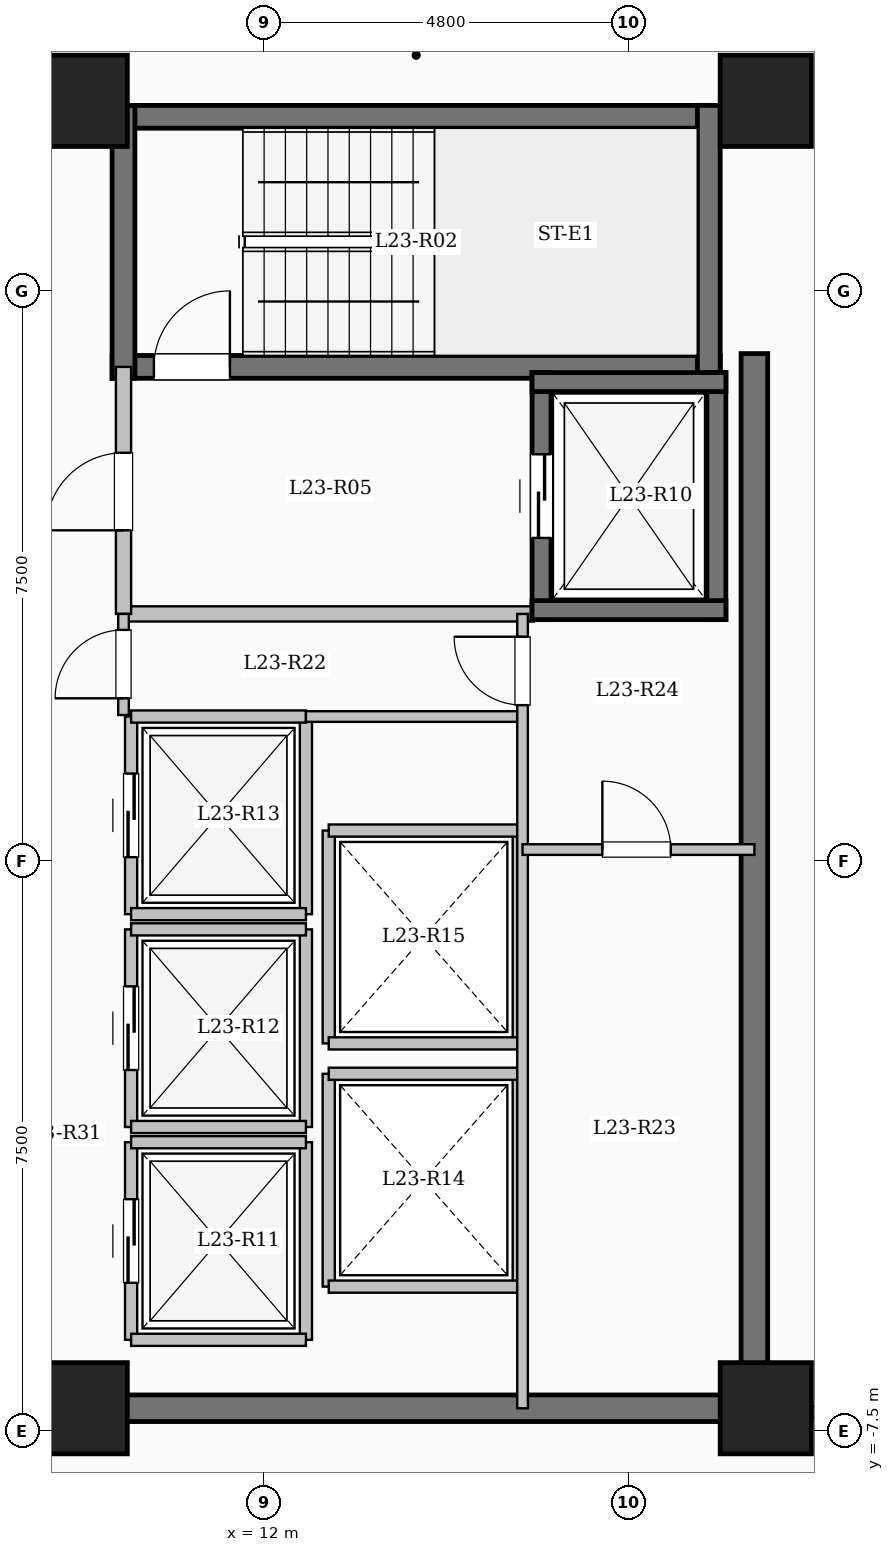
"""IFC4 building model, lengths in metres.
Left out: names, types, materials, properties, quantities, classifications, styles, units other than length and angle.
Written with IfcOpenShell. Run it as: python <this file> out.ifc"""

import sys

from ifc_helpers import new_model, si_unit, direction, frame, frame_2d, origin, origin_2d, place, context, subcontext, project, spatial, rectangle, extrude, element, fill, save


model = new_model("IFC4")
c1 = context("Model", 3, precision=1e-05, world=origin(), true_north=direction((0.0, 1.0)))
c2 = subcontext(c1, "Body", "Model", "MODEL_VIEW")
j1 = project(units=[si_unit("LENGTHUNIT", "METRE"), si_unit("PLANEANGLEUNIT", "RADIAN")], contexts=[c1])
p1 = place(None, origin())
s1 = spatial("IfcSite", under=j1, at=p1, CompositionType="ELEMENT")
p2 = place(p1, origin())
s2 = spatial("IfcBuilding", under=s1, at=p2, CompositionType="ELEMENT")
p3 = place(p2, frame((0.0, 0.0, 88.35)))
s3 = spatial("IfcBuildingStorey", under=s2, at=p3, CompositionType="ELEMENT", Elevation=88.35)
for number, where, z_axis, x_axis in (
    (1, (9.6, -7.2, 0.0), (0.0, 0.0, 1.0), (1.0, 0.0, 0.0)),
    (2, (9.6, 10.0, 0.0), (0.0, 0.0, 1.0), (1.0, 0.0, 0.0)),
    (3, (18.6, -7.2, 0.0), (0.0, 0.0, 1.0), (1.0, 0.0, 0.0)),
    (4, (18.6, 10.0, 0.0), (0.0, 0.0, 1.0), (1.0, 0.0, 0.0)),
):
    element("IfcColumn", number, at=place(p3, frame(where, z_axis=z_axis, x_axis=x_axis)), inside=s3, PredefinedType="COLUMN", context=c2, shape_type="SweptSolid", body=[
        extrude(rectangle(XDim=1.2, YDim=1.2, at=origin_2d()), origin(), (0.0, 0.0, 1.0), 3.35),
    ])
p4 = place(p3, frame((10.0, 9.79, 0.0), z_axis=(0.0, 0.0, 1.0), x_axis=(1.0, 0.0, 0.0)))
e5 = element("IfcWall", 5, at=p4, inside=s3, PredefinedType="SHEAR", context=c2, shape_type="SweptSolid", body=[
    extrude(rectangle(XDim=8.0, YDim=0.3, at=frame_2d((4.0, 0.0))), origin(), (0.0, 0.0, 1.0), 3.35),
])
p5 = place(p3, frame((10.0, 6.5, 0.0), z_axis=(0.0, 0.0, 1.0), x_axis=(1.0, 0.0, 0.0)))
e6 = element("IfcWall", 6, at=p5, inside=s3, PredefinedType="SHEAR", context=c2, shape_type="SweptSolid", body=[
    extrude(rectangle(XDim=8.0, YDim=0.3, at=frame_2d((4.0, 0.0))), origin(), (0.0, 0.0, 1.0), 3.35),
])
p6 = place(p5, frame((0.55, 0.0, 0.0)))
e7 = element("IfcOpeningElement", 7, at=p6, cuts=e6, PredefinedType="OPENING", context=c2, shape_type="SweptSolid", body=[
    extrude(rectangle(XDim=1.0, YDim=2.15, at=frame_2d((0.5, 1.075))), frame((0.0, 0.16, 0.0), z_axis=(0.0, -1.0, 0.0), x_axis=(1.0, 0.0, 0.0)), (0.0, 0.0, 1.0), 0.32),
])
for number, where, z_axis, x_axis in (
    (8, (10.15, 6.35, 0.0), (0.0, 0.0, 1.0), (0.0, 1.0, 0.0)),
    (9, (17.85, 6.35, 0.0), (0.0, 0.0, 1.0), (0.0, 1.0, 0.0)),
):
    element("IfcWall", number, at=place(p3, frame(where, z_axis=z_axis, x_axis=x_axis)), inside=s3, PredefinedType="SHEAR", context=c2, shape_type="SweptSolid", body=[
        extrude(rectangle(XDim=3.59, YDim=0.3, at=frame_2d((1.795, 0.0))), origin(), (0.0, 0.0, 1.0), 3.35),
    ])
p7 = place(p3, frame((10.15, 3.25, 0.0), z_axis=(0.0, 0.0, 1.0), x_axis=(1.0, 0.0, 0.0)))
e10 = element("IfcWall", 10, at=p7, inside=s3, PredefinedType="SOLIDWALL", context=c2, shape_type="SweptSolid", body=[
    extrude(rectangle(XDim=5.4, YDim=0.2, at=frame_2d((2.7, 0.0))), origin(), (0.0, 0.0, 1.0), 3.1),
])
p8 = place(p3, frame((10.15, 3.25, 0.0), z_axis=(0.0, 0.0, 1.0), x_axis=(0.0, 1.0, 0.0)))
e11 = element("IfcWall", 11, at=p8, inside=s3, PredefinedType="SOLIDWALL", context=c2, shape_type="SweptSolid", body=[
    extrude(rectangle(XDim=3.25, YDim=0.2, at=frame_2d((1.625, 0.0))), origin(), (0.0, 0.0, 1.0), 3.1),
])
p9 = place(p8, frame((1.1, 0.0, 0.0)))
e12 = element("IfcOpeningElement", 12, at=p9, cuts=e11, PredefinedType="OPENING", context=c2, shape_type="SweptSolid", body=[
    extrude(rectangle(XDim=1.02, YDim=2.15, at=frame_2d((0.51, 1.075))), frame((0.0, 0.11, 0.0), z_axis=(0.0, -1.0, 0.0), x_axis=(1.0, 0.0, 0.0)), (0.0, 0.0, 1.0), 0.22),
])
p10 = place(p3, frame((15.65, 3.175, 0.0), z_axis=(0.0, 0.0, 1.0), x_axis=(0.0, 1.0, 0.0)))
e13 = element("IfcWall", 13, at=p10, inside=s3, PredefinedType="SHEAR", context=c2, shape_type="SweptSolid", body=[
    extrude(rectangle(XDim=3.25, YDim=0.25, at=frame_2d((1.625, 0.0))), origin(), (0.0, 0.0, 1.0), 3.35),
])
p11 = place(p10, frame((1.075, 0.0, 0.0)))
e14 = element("IfcOpeningElement", 14, at=p11, cuts=e13, PredefinedType="OPENING", context=c2, shape_type="SweptSolid", body=[
    extrude(rectangle(XDim=1.1, YDim=2.15, at=frame_2d((0.55, 1.075))), frame((0.0, 0.135, 0.0), z_axis=(0.0, -1.0, 0.0), x_axis=(1.0, 0.0, 0.0)), (0.0, 0.0, 1.0), 0.27),
])
p12 = place(p3, frame((17.95, 3.175, 0.0), z_axis=(0.0, 0.0, 1.0), x_axis=(0.0, 1.0, 0.0)))
e15 = element("IfcWall", 15, at=p12, inside=s3, PredefinedType="SHEAR", context=c2, shape_type="SweptSolid", body=[
    extrude(rectangle(XDim=3.25, YDim=0.25, at=frame_2d((1.625, 0.0))), origin(), (0.0, 0.0, 1.0), 3.35),
])
for number, where, z_axis, x_axis in (
    (16, (15.525, 3.3, 0.0), (0.0, 0.0, 1.0), (1.0, 0.0, 0.0)),
    (17, (15.525, 6.3, 0.0), (0.0, 0.0, 1.0), (1.0, 0.0, 0.0)),
):
    element("IfcWall", number, at=place(p3, frame(where, z_axis=z_axis, x_axis=x_axis)), inside=s3, PredefinedType="SHEAR", context=c2, shape_type="SweptSolid", body=[
        extrude(rectangle(XDim=2.55, YDim=0.25, at=frame_2d((1.275, 0.0))), origin(), (0.0, 0.0, 1.0), 3.35),
    ])
p13 = place(p3, frame((10.25, -6.3, 0.0), z_axis=(0.0, 0.0, 1.0), x_axis=(0.0, 1.0, 0.0)))
e18 = element("IfcWall", 18, at=p13, inside=s3, PredefinedType="SOLIDWALL", context=c2, shape_type="SweptSolid", body=[
    extrude(rectangle(XDim=2.6, YDim=0.16, at=frame_2d((1.3, 0.0))), origin(), (0.0, 0.0, 1.0), 3.1),
])
p14 = place(p13, frame((0.75, 0.0, 0.0)))
e19 = element("IfcOpeningElement", 19, at=p14, cuts=e18, PredefinedType="OPENING", context=c2, shape_type="SweptSolid", body=[
    extrude(rectangle(XDim=1.1, YDim=2.15, at=frame_2d((0.55, 1.075))), frame((0.0, 0.09, 0.0), z_axis=(0.0, -1.0, 0.0), x_axis=(1.0, 0.0, 0.0)), (0.0, 0.0, 1.0), 0.18),
])
p15 = place(p3, frame((12.55, -6.3, 0.0), z_axis=(0.0, 0.0, 1.0), x_axis=(0.0, 1.0, 0.0)))
e20 = element("IfcWall", 20, at=p15, inside=s3, PredefinedType="SOLIDWALL", context=c2, shape_type="SweptSolid", body=[
    extrude(rectangle(XDim=2.6, YDim=0.16, at=frame_2d((1.3, 0.0))), origin(), (0.0, 0.0, 1.0), 3.1),
])
for number, where, z_axis, x_axis in (
    (21, (10.25, -6.3, 0.0), (0.0, 0.0, 1.0), (1.0, 0.0, 0.0)),
    (22, (10.25, -3.7, 0.0), (0.0, 0.0, 1.0), (1.0, 0.0, 0.0)),
):
    element("IfcWall", number, at=place(p3, frame(where, z_axis=z_axis, x_axis=x_axis)), inside=s3, PredefinedType="SOLIDWALL", context=c2, shape_type="SweptSolid", body=[
        extrude(rectangle(XDim=2.3, YDim=0.16, at=frame_2d((1.15, 0.0))), origin(), (0.0, 0.0, 1.0), 3.1),
    ])
p16 = place(p3, frame((10.25, -3.5, 0.0), z_axis=(0.0, 0.0, 1.0), x_axis=(0.0, 1.0, 0.0)))
e23 = element("IfcWall", 23, at=p16, inside=s3, PredefinedType="SOLIDWALL", context=c2, shape_type="SweptSolid", body=[
    extrude(rectangle(XDim=2.6, YDim=0.16, at=frame_2d((1.3, 0.0))), origin(), (0.0, 0.0, 1.0), 3.1),
])
p17 = place(p16, frame((0.75, 0.0, 0.0)))
e24 = element("IfcOpeningElement", 24, at=p17, cuts=e23, PredefinedType="OPENING", context=c2, shape_type="SweptSolid", body=[
    extrude(rectangle(XDim=1.1, YDim=2.15, at=frame_2d((0.55, 1.075))), frame((0.0, 0.09, 0.0), z_axis=(0.0, -1.0, 0.0), x_axis=(1.0, 0.0, 0.0)), (0.0, 0.0, 1.0), 0.18),
])
p18 = place(p3, frame((12.55, -3.5, 0.0), z_axis=(0.0, 0.0, 1.0), x_axis=(0.0, 1.0, 0.0)))
e25 = element("IfcWall", 25, at=p18, inside=s3, PredefinedType="SOLIDWALL", context=c2, shape_type="SweptSolid", body=[
    extrude(rectangle(XDim=2.6, YDim=0.16, at=frame_2d((1.3, 0.0))), origin(), (0.0, 0.0, 1.0), 3.1),
])
for number, where, z_axis, x_axis in (
    (26, (10.25, -3.5, 0.0), (0.0, 0.0, 1.0), (1.0, 0.0, 0.0)),
    (27, (10.25, -0.9, 0.0), (0.0, 0.0, 1.0), (1.0, 0.0, 0.0)),
):
    element("IfcWall", number, at=place(p3, frame(where, z_axis=z_axis, x_axis=x_axis)), inside=s3, PredefinedType="SOLIDWALL", context=c2, shape_type="SweptSolid", body=[
        extrude(rectangle(XDim=2.3, YDim=0.16, at=frame_2d((1.15, 0.0))), origin(), (0.0, 0.0, 1.0), 3.1),
    ])
p19 = place(p3, frame((10.25, -0.7, 0.0), z_axis=(0.0, 0.0, 1.0), x_axis=(0.0, 1.0, 0.0)))
e28 = element("IfcWall", 28, at=p19, inside=s3, PredefinedType="SOLIDWALL", context=c2, shape_type="SweptSolid", body=[
    extrude(rectangle(XDim=2.6, YDim=0.16, at=frame_2d((1.3, 0.0))), origin(), (0.0, 0.0, 1.0), 3.1),
])
p20 = place(p19, frame((0.75, 0.0, 0.0)))
e29 = element("IfcOpeningElement", 29, at=p20, cuts=e28, PredefinedType="OPENING", context=c2, shape_type="SweptSolid", body=[
    extrude(rectangle(XDim=1.1, YDim=2.15, at=frame_2d((0.55, 1.075))), frame((0.0, 0.09, 0.0), z_axis=(0.0, -1.0, 0.0), x_axis=(1.0, 0.0, 0.0)), (0.0, 0.0, 1.0), 0.18),
])
p21 = place(p3, frame((12.55, -0.7, 0.0), z_axis=(0.0, 0.0, 1.0), x_axis=(0.0, 1.0, 0.0)))
e30 = element("IfcWall", 30, at=p21, inside=s3, PredefinedType="SOLIDWALL", context=c2, shape_type="SweptSolid", body=[
    extrude(rectangle(XDim=2.6, YDim=0.16, at=frame_2d((1.3, 0.0))), origin(), (0.0, 0.0, 1.0), 3.1),
])
for number, where, z_axis, x_axis in (
    (31, (10.25, -0.7, 0.0), (0.0, 0.0, 1.0), (1.0, 0.0, 0.0)),
    (32, (10.25, 1.9, 0.0), (0.0, 0.0, 1.0), (1.0, 0.0, 0.0)),
):
    element("IfcWall", number, at=place(p3, frame(where, z_axis=z_axis, x_axis=x_axis)), inside=s3, PredefinedType="SOLIDWALL", context=c2, shape_type="SweptSolid", body=[
        extrude(rectangle(XDim=2.3, YDim=0.16, at=frame_2d((1.15, 0.0))), origin(), (0.0, 0.0, 1.0), 3.1),
    ])
for number, where, z_axis, x_axis in (
    (33, (12.85, -5.6, 0.0), (0.0, 0.0, 1.0), (0.0, 1.0, 0.0)),
    (34, (15.35, -5.6, 0.0), (0.0, 0.0, 1.0), (0.0, 1.0, 0.0)),
):
    element("IfcWall", number, at=place(p3, frame(where, z_axis=z_axis, x_axis=x_axis)), inside=s3, PredefinedType="SOLIDWALL", context=c2, shape_type="SweptSolid", body=[
        extrude(rectangle(XDim=2.8, YDim=0.16, at=frame_2d((1.4, 0.0))), origin(), (0.0, 0.0, 1.0), 3.1),
    ])
for number, where, z_axis, x_axis in (
    (35, (12.85, -5.6, 0.0), (0.0, 0.0, 1.0), (1.0, 0.0, 0.0)),
    (36, (12.85, -2.8, 0.0), (0.0, 0.0, 1.0), (1.0, 0.0, 0.0)),
):
    element("IfcWall", number, at=place(p3, frame(where, z_axis=z_axis, x_axis=x_axis)), inside=s3, PredefinedType="SOLIDWALL", context=c2, shape_type="SweptSolid", body=[
        extrude(rectangle(XDim=2.5, YDim=0.16, at=frame_2d((1.25, 0.0))), origin(), (0.0, 0.0, 1.0), 3.1),
    ])
for number, where, z_axis, x_axis in (
    (37, (12.85, -2.4, 0.0), (0.0, 0.0, 1.0), (0.0, 1.0, 0.0)),
    (38, (15.35, -2.4, 0.0), (0.0, 0.0, 1.0), (0.0, 1.0, 0.0)),
):
    element("IfcWall", number, at=place(p3, frame(where, z_axis=z_axis, x_axis=x_axis)), inside=s3, PredefinedType="SOLIDWALL", context=c2, shape_type="SweptSolid", body=[
        extrude(rectangle(XDim=2.8, YDim=0.16, at=frame_2d((1.4, 0.0))), origin(), (0.0, 0.0, 1.0), 3.1),
    ])
for number, where, z_axis, x_axis in (
    (39, (12.85, -2.4, 0.0), (0.0, 0.0, 1.0), (1.0, 0.0, 0.0)),
    (40, (12.85, 0.4, 0.0), (0.0, 0.0, 1.0), (1.0, 0.0, 0.0)),
):
    element("IfcWall", number, at=place(p3, frame(where, z_axis=z_axis, x_axis=x_axis)), inside=s3, PredefinedType="SOLIDWALL", context=c2, shape_type="SweptSolid", body=[
        extrude(rectangle(XDim=2.5, YDim=0.16, at=frame_2d((1.25, 0.0))), origin(), (0.0, 0.0, 1.0), 3.1),
    ])
p22 = place(p3, frame((18.45, -7.375, 0.0), z_axis=(0.0, 0.0, 1.0), x_axis=(0.0, 1.0, 0.0)))
e41 = element("IfcWall", 41, at=p22, inside=s3, PredefinedType="SHEAR", context=c2, shape_type="SweptSolid", body=[
    extrude(rectangle(XDim=14.05, YDim=0.35, at=frame_2d((7.025, 0.0))), origin(), (0.0, 0.0, 1.0), 3.35),
])
p23 = place(p3, frame((10.075, -7.2, 0.0), z_axis=(0.0, 0.0, 1.0), x_axis=(1.0, 0.0, 0.0)))
e42 = element("IfcWall", 42, at=p23, inside=s3, PredefinedType="SHEAR", context=c2, shape_type="SweptSolid", body=[
    extrude(rectangle(XDim=8.55, YDim=0.35, at=frame_2d((4.275, 0.0))), origin(), (0.0, 0.0, 1.0), 3.35),
])
p24 = place(p3, frame((12.55, 1.9, 0.0), z_axis=(0.0, 0.0, 1.0), x_axis=(1.0, 0.0, 0.0)))
e43 = element("IfcWall", 43, at=p24, inside=s3, PredefinedType="PARTITIONING", context=c2, shape_type="SweptSolid", body=[
    extrude(rectangle(XDim=2.85, YDim=0.14, at=frame_2d((1.425, 0.0))), origin(), (0.0, 0.0, 1.0), 3.1),
])
p25 = place(p3, frame((10.15, 1.92, 0.0), z_axis=(0.0, 0.0, 1.0), x_axis=(0.0, 1.0, 0.0)))
e44 = element("IfcWall", 44, at=p25, inside=s3, PredefinedType="PARTITIONING", context=c2, shape_type="SweptSolid", body=[
    extrude(rectangle(XDim=1.33, YDim=0.14, at=frame_2d((0.665, 0.0))), origin(), (0.0, 0.0, 1.0), 3.1),
])
p26 = place(p25, frame((0.22, 0.0, 0.0)))
e45 = element("IfcOpeningElement", 45, at=p26, cuts=e44, PredefinedType="OPENING", context=c2, shape_type="SweptSolid", body=[
    extrude(rectangle(XDim=0.9, YDim=2.08, at=frame_2d((0.45, 1.04))), frame((0.0, 0.08, 0.0), z_axis=(0.0, -1.0, 0.0), x_axis=(1.0, 0.0, 0.0)), (0.0, 0.0, 1.0), 0.16),
])
p27 = place(p3, frame((15.4, -7.2, 0.0), z_axis=(0.0, 0.0, 1.0), x_axis=(0.0, 1.0, 0.0)))
e46 = element("IfcWall", 46, at=p27, inside=s3, PredefinedType="PARTITIONING", context=c2, shape_type="SweptSolid", body=[
    extrude(rectangle(XDim=10.45, YDim=0.14, at=frame_2d((5.225, 0.0))), origin(), (0.0, 0.0, 1.0), 3.1),
])
p28 = place(p27, frame((9.25, 0.0, 0.0)))
e47 = element("IfcOpeningElement", 47, at=p28, cuts=e46, PredefinedType="OPENING", context=c2, shape_type="SweptSolid", body=[
    extrude(rectangle(XDim=0.9, YDim=2.08, at=frame_2d((0.45, 1.04))), frame((0.0, 0.08, 0.0), z_axis=(0.0, -1.0, 0.0), x_axis=(1.0, 0.0, 0.0)), (0.0, 0.0, 1.0), 0.16),
])
p29 = place(p3, frame((15.4, 0.15, 0.0), z_axis=(0.0, 0.0, 1.0), x_axis=(1.0, 0.0, 0.0)))
e48 = element("IfcWall", 48, at=p29, inside=s3, PredefinedType="PARTITIONING", context=c2, shape_type="SweptSolid", body=[
    extrude(rectangle(XDim=3.05, YDim=0.14, at=frame_2d((1.525, 0.0))), origin(), (0.0, 0.0, 1.0), 3.1),
])
p30 = place(p29, frame((1.05, 0.0, 0.0)))
e49 = element("IfcOpeningElement", 49, at=p30, cuts=e48, PredefinedType="OPENING", context=c2, shape_type="SweptSolid", body=[
    extrude(rectangle(XDim=0.9, YDim=2.08, at=frame_2d((0.45, 1.04))), frame((0.0, 0.08, 0.0), z_axis=(0.0, -1.0, 0.0), x_axis=(1.0, 0.0, 0.0)), (0.0, 0.0, 1.0), 0.16),
])
p31 = place(p3, frame((18.45, -7.25, 0.0), z_axis=(0.0, 0.0, 1.0), x_axis=(1.0, 0.0, 0.0)))
e50 = element("IfcWall", 50, at=p31, inside=s3, PredefinedType="PARTITIONING", context=c2, shape_type="SweptSolid", body=[
    extrude(rectangle(XDim=8.43, YDim=0.15, at=frame_2d((4.215, 0.0))), origin(), (0.0, 0.0, 1.0), 3.1),
])
p32 = place(p31, frame((1.95, 0.0, 0.0)))
e51 = element("IfcOpeningElement", 51, at=p32, cuts=e50, PredefinedType="OPENING", context=c2, shape_type="SweptSolid", body=[
    extrude(rectangle(XDim=1.08, YDim=2.15, at=frame_2d((0.54, 1.075))), frame((0.0, 0.085, 0.0), z_axis=(0.0, -1.0, 0.0), x_axis=(1.0, 0.0, 0.0)), (0.0, 0.0, 1.0), 0.17),
])
p33 = place(p6, origin())
e52 = element("IfcDoor", 52, at=p33, inside=s3, OperationType="SINGLE_SWING_RIGHT", PredefinedType="DOOR", context=c2, shape_type="SweptSolid", body=[
    extrude(rectangle(XDim=1.0, YDim=2.15, at=frame_2d((0.5, 1.075))), frame((0.0, 0.025, 0.0), z_axis=(0.0, -1.0, 0.0), x_axis=(1.0, 0.0, 0.0)), (0.0, 0.0, 1.0), 0.05),
])
fill(e7, e52)
p34 = place(p9, origin())
e53 = element("IfcDoor", 53, at=p34, inside=s3, OperationType="SINGLE_SWING_LEFT", PredefinedType="DOOR", context=c2, shape_type="SweptSolid", body=[
    extrude(rectangle(XDim=1.02, YDim=2.15, at=frame_2d((0.51, 1.075))), frame((0.0, 0.025, 0.0), z_axis=(0.0, -1.0, 0.0), x_axis=(1.0, 0.0, 0.0)), (0.0, 0.0, 1.0), 0.05),
])
fill(e12, e53)
p35 = place(p11, origin())
e54 = element("IfcDoor", 54, at=p35, inside=s3, OperationType="SLIDING_TO_LEFT", PredefinedType="DOOR", context=c2, shape_type="SweptSolid", body=[
    extrude(rectangle(XDim=1.1, YDim=2.15, at=frame_2d((0.55, 1.075))), frame((0.0, 0.025, 0.0), z_axis=(0.0, -1.0, 0.0), x_axis=(1.0, 0.0, 0.0)), (0.0, 0.0, 1.0), 0.05),
])
fill(e14, e54)
p36 = place(p14, origin())
e55 = element("IfcDoor", 55, at=p36, inside=s3, OperationType="SLIDING_TO_LEFT", PredefinedType="DOOR", context=c2, shape_type="SweptSolid", body=[
    extrude(rectangle(XDim=1.1, YDim=2.15, at=frame_2d((0.55, 1.075))), frame((0.0, 0.025, 0.0), z_axis=(0.0, -1.0, 0.0), x_axis=(1.0, 0.0, 0.0)), (0.0, 0.0, 1.0), 0.05),
])
fill(e19, e55)
p37 = place(p17, origin())
e56 = element("IfcDoor", 56, at=p37, inside=s3, OperationType="SLIDING_TO_LEFT", PredefinedType="DOOR", context=c2, shape_type="SweptSolid", body=[
    extrude(rectangle(XDim=1.1, YDim=2.15, at=frame_2d((0.55, 1.075))), frame((0.0, 0.025, 0.0), z_axis=(0.0, -1.0, 0.0), x_axis=(1.0, 0.0, 0.0)), (0.0, 0.0, 1.0), 0.05),
])
fill(e24, e56)
p38 = place(p20, origin())
e57 = element("IfcDoor", 57, at=p38, inside=s3, OperationType="SLIDING_TO_LEFT", PredefinedType="DOOR", context=c2, shape_type="SweptSolid", body=[
    extrude(rectangle(XDim=1.1, YDim=2.15, at=frame_2d((0.55, 1.075))), frame((0.0, 0.025, 0.0), z_axis=(0.0, -1.0, 0.0), x_axis=(1.0, 0.0, 0.0)), (0.0, 0.0, 1.0), 0.05),
])
fill(e29, e57)
p39 = place(p26, origin())
e58 = element("IfcDoor", 58, at=p39, inside=s3, OperationType="SINGLE_SWING_LEFT", PredefinedType="DOOR", context=c2, shape_type="SweptSolid", body=[
    extrude(rectangle(XDim=0.9, YDim=2.08, at=frame_2d((0.45, 1.04))), frame((0.0, 0.025, 0.0), z_axis=(0.0, -1.0, 0.0), x_axis=(1.0, 0.0, 0.0)), (0.0, 0.0, 1.0), 0.05),
])
fill(e45, e58)
p40 = place(p28, origin())
e59 = element("IfcDoor", 59, at=p40, inside=s3, OperationType="SINGLE_SWING_RIGHT", PredefinedType="DOOR", context=c2, shape_type="SweptSolid", body=[
    extrude(rectangle(XDim=0.9, YDim=2.08, at=frame_2d((0.45, 1.04))), frame((0.0, 0.025, 0.0), z_axis=(0.0, -1.0, 0.0), x_axis=(1.0, 0.0, 0.0)), (0.0, 0.0, 1.0), 0.05),
])
fill(e47, e59)
p41 = place(p30, origin())
e60 = element("IfcDoor", 60, at=p41, inside=s3, OperationType="SINGLE_SWING_LEFT", PredefinedType="DOOR", context=c2, shape_type="SweptSolid", body=[
    extrude(rectangle(XDim=0.9, YDim=2.08, at=frame_2d((0.45, 1.04))), frame((0.0, 0.025, 0.0), z_axis=(0.0, -1.0, 0.0), x_axis=(1.0, 0.0, 0.0)), (0.0, 0.0, 1.0), 0.05),
])
fill(e49, e60)
save(model, sys.argv[1])
